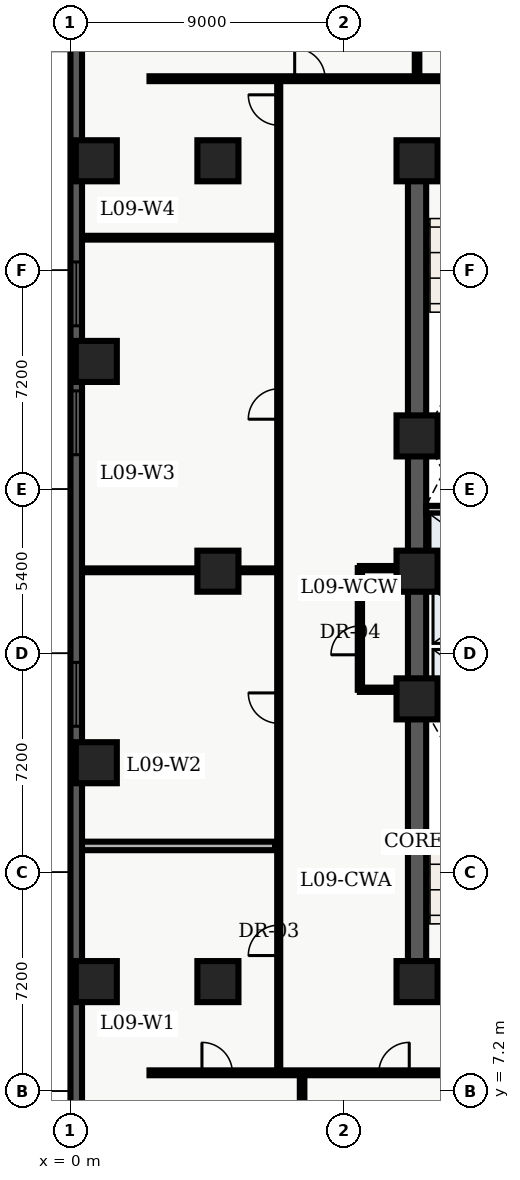
"""IFC4 building model, lengths in metres.
Left out: names, types, materials, properties, quantities, classifications, styles, units other than length and angle.
Written with IfcOpenShell. Run it as: python <this file> out.ifc"""

import sys

from ifc_helpers import new_model, entity, si_unit, converted_unit, direction, frame, origin_with_axes, origin_2d_with_axis, place, context, subcontext, project, spatial, polyline, rectangle, outline, extrude, element, fill, save


model = new_model("IFC4")
c1 = context("Model", 3, precision=1e-05, world=origin_with_axes(), true_north=direction((0.0, 1.0)))
c2 = subcontext(c1, "Body", "Model", "MODEL_VIEW")
j1 = project(units=[si_unit("LENGTHUNIT", "METRE"), converted_unit("PLANEANGLEUNIT", "DEGREE", entity("IfcPlaneAngleMeasure", 0.017), si_unit("PLANEANGLEUNIT", "RADIAN"), dimensions=[0, 0, 0, 0, 0, 0, 0])], contexts=[c1])
p1 = place(None, origin_with_axes())
s1 = spatial("IfcSite", under=j1, at=p1, CompositionType="ELEMENT")
p2 = place(p1, origin_with_axes())
s2 = spatial("IfcBuilding", under=s1, at=p2, CompositionType="ELEMENT")
p3 = place(p2, frame((0.0, 0.0, 40.5), z_axis=(0.0, 0.0, 1.0), x_axis=(1.0, 0.0, 0.0)))
s3 = spatial("IfcBuildingStorey", under=s2, at=p3, CompositionType="ELEMENT", Elevation=40.5)
p4 = place(p3, frame((11.4, 10.8, 0.0), z_axis=(0.0, 0.0, 1.0), x_axis=(0.0, 1.0, 0.0)))
e1 = element("IfcWall", 1, at=p4, inside=s3, PredefinedType="SHEAR", context=c2, shape_type="SweptSolid", body=[
    extrude(outline(polyline([(0.0, -0.3), (27.0, -0.3), (27.0, 0.3), (0.0, 0.3), (0.0, -0.3)])), origin_with_axes(), (0.0, 0.0, 1.0), 3.66),
])
p5 = place(p3, frame((11.4, 10.8, 0.0), z_axis=(0.0, 0.0, 1.0), x_axis=(1.0, 0.0, 0.0)))
e2 = element("IfcWall", 2, at=p5, inside=s3, PredefinedType="SHEAR", context=c2, shape_type="SweptSolid", body=[
    extrude(outline(polyline([(0.0, -0.3), (7.2, -0.3), (7.2, 0.3), (0.0, 0.3), (0.0, -0.3)])), origin_with_axes(), (0.0, 0.0, 1.0), 3.66),
])
p6 = place(p5, frame((2.625, 0.0, 0.0), z_axis=(0.0, 0.0, 1.0), x_axis=(1.0, 0.0, 0.0)))
e3 = element("IfcOpeningElement", 3, at=p6, cuts=e2, PredefinedType="OPENING", context=c2, shape_type="SweptSolid", body=[
    extrude(rectangle(XDim=1.05, YDim=0.62, at=origin_2d_with_axis()), origin_with_axes(), (0.0, 0.0, 1.0), 2.15),
])
p7 = place(p3, frame((11.4, 37.8, 0.0), z_axis=(0.0, 0.0, 1.0), x_axis=(1.0, 0.0, 0.0)))
e4 = element("IfcWall", 4, at=p7, inside=s3, PredefinedType="SHEAR", context=c2, shape_type="SweptSolid", body=[
    extrude(outline(polyline([(0.0, -0.3), (7.2, -0.3), (7.2, 0.3), (0.0, 0.3), (0.0, -0.3)])), origin_with_axes(), (0.0, 0.0, 1.0), 3.66),
])
p8 = place(p7, frame((2.625, 0.0, 0.0), z_axis=(0.0, 0.0, 1.0), x_axis=(1.0, 0.0, 0.0)))
e5 = element("IfcOpeningElement", 5, at=p8, cuts=e4, PredefinedType="OPENING", context=c2, shape_type="SweptSolid", body=[
    extrude(rectangle(XDim=1.05, YDim=0.62, at=origin_2d_with_axis()), origin_with_axes(), (0.0, 0.0, 1.0), 2.15),
])
for number, where, z_axis, x_axis in (
    (6, (11.7, 19.825, 0.0), (0.0, 0.0, 1.0), (1.0, 0.0, 0.0)),
    (7, (11.7, 28.775, 0.0), (0.0, 0.0, 1.0), (1.0, 0.0, 0.0)),
):
    element("IfcWall", number, at=place(p3, frame(where, z_axis=z_axis, x_axis=x_axis)), inside=s3, PredefinedType="SHEAR", context=c2, shape_type="SweptSolid", body=[
        extrude(outline(polyline([(0.0, -0.125), (6.6, -0.125), (6.6, 0.125), (0.0, 0.125), (0.0, -0.125)])), origin_with_axes(), (0.0, 0.0, 1.0), 3.66),
    ])
p9 = place(p3, frame((11.7, 24.1, 0.0), z_axis=(0.0, 0.0, 1.0), x_axis=(1.0, 0.0, 0.0)))
e8 = element("IfcWall", 8, at=p9, inside=s3, PredefinedType="SOLIDWALL", context=c2, shape_type="SweptSolid", body=[
    extrude(outline(polyline([(0.0, -0.125), (6.6, -0.125), (6.6, 0.125), (0.0, 0.125), (0.0, -0.125)])), origin_with_axes(), (0.0, 0.0, 1.0), 2.7),
])
p10 = place(p9, frame((3.75, 0.0, 0.0), z_axis=(0.0, 0.0, 1.0), x_axis=(1.0, 0.0, 0.0)))
e9 = element("IfcOpeningElement", 9, at=p10, cuts=e8, PredefinedType="OPENING", context=c2, shape_type="SweptSolid", body=[
    extrude(rectangle(XDim=0.9, YDim=0.27, at=origin_2d_with_axis()), origin_with_axes(), (0.0, 0.0, 1.0), 2.15),
])
p11 = place(p3, frame((11.7, 26.325, 0.0), z_axis=(0.0, 0.0, 1.0), x_axis=(1.0, 0.0, 0.0)))
e10 = element("IfcWall", 10, at=p11, inside=s3, PredefinedType="SOLIDWALL", context=c2, shape_type="SweptSolid", body=[
    extrude(outline(polyline([(0.0, -0.125), (6.6, -0.125), (6.6, 0.125), (0.0, 0.125), (0.0, -0.125)])), origin_with_axes(), (0.0, 0.0, 1.0), 2.7),
])
p12 = place(p11, frame((3.5, 0.0, 0.0), z_axis=(0.0, 0.0, 1.0), x_axis=(1.0, 0.0, 0.0)))
e11 = element("IfcOpeningElement", 11, at=p12, cuts=e10, PredefinedType="OPENING", context=c2, shape_type="SweptSolid", body=[
    extrude(rectangle(XDim=0.9, YDim=0.27, at=origin_2d_with_axis()), origin_with_axes(), (0.0, 0.0, 1.0), 2.15),
])
for number, where, z_axis, x_axis in (
    (12, (11.4, 10.8, 0.0), (0.0, 0.0, 1.0), (1.0, 0.0, 0.0)),
    (13, (11.4, 20.1, 0.0), (0.0, 0.0, 1.0), (1.0, 0.0, 0.0)),
    (14, (11.4, 24.3, 0.0), (0.0, 0.0, 1.0), (1.0, 0.0, 0.0)),
    (15, (11.4, 28.75, 0.0), (0.0, 0.0, 1.0), (1.0, 0.0, 0.0)),
    (16, (11.4, 37.8, 0.0), (0.0, 0.0, 1.0), (1.0, 0.0, 0.0)),
    (17, (4.85, 10.8, 0.0), (0.0, 0.0, 1.0), (1.0, 0.0, 0.0)),
    (18, (4.85, 24.3, 0.0), (0.0, 0.0, 1.0), (1.0, 0.0, 0.0)),
    (19, (4.85, 37.8, 0.0), (0.0, 0.0, 1.0), (1.0, 0.0, 0.0)),
    (20, (0.85, 10.8, 0.0), (0.0, 0.0, 1.0), (1.0, 0.0, 0.0)),
    (21, (0.85, 18.0, 0.0), (0.0, 0.0, 1.0), (1.0, 0.0, 0.0)),
    (22, (0.85, 31.2, 0.0), (0.0, 0.0, 1.0), (1.0, 0.0, 0.0)),
    (23, (0.85, 37.8, 0.0), (0.0, 0.0, 1.0), (1.0, 0.0, 0.0)),
):
    element("IfcColumn", number, at=place(p3, frame(where, z_axis=z_axis, x_axis=x_axis)), inside=s3, PredefinedType="COLUMN", context=c2, shape_type="SweptSolid", body=[
        extrude(rectangle(XDim=1.35, YDim=1.35, at=origin_2d_with_axis()), origin_with_axes(), (0.0, 0.0, 1.0), 3.9),
    ])
p13 = place(p3, frame((9.52, 20.4, 0.0), z_axis=(0.0, 0.0, 1.0), x_axis=(0.0, 1.0, 0.0)))
e24 = element("IfcWall", 24, at=p13, inside=s3, PredefinedType="PARTITIONING", context=c2, shape_type="SweptSolid", body=[
    extrude(outline(polyline([(0.0, -0.07), (4.0, -0.07), (4.0, 0.07), (0.0, 0.07), (0.0, -0.07)])), origin_with_axes(), (0.0, 0.0, 1.0), 2.7),
])
p14 = place(p13, frame((1.625, 0.0, 0.0), z_axis=(0.0, 0.0, 1.0), x_axis=(1.0, 0.0, 0.0)))
e25 = element("IfcOpeningElement", 25, at=p14, cuts=e24, PredefinedType="OPENING", context=c2, shape_type="SweptSolid", body=[
    extrude(rectangle(XDim=0.95, YDim=0.16, at=origin_2d_with_axis()), origin_with_axes(), (0.0, 0.0, 1.0), 2.15),
])
for number, where, z_axis, x_axis in (
    (26, (9.52, 20.4, 0.0), (0.0, 0.0, 1.0), (1.0, 0.0, 0.0)),
    (27, (9.52, 24.4, 0.0), (0.0, 0.0, 1.0), (1.0, 0.0, 0.0)),
):
    element("IfcWall", number, at=place(p3, frame(where, z_axis=z_axis, x_axis=x_axis)), inside=s3, PredefinedType="PARTITIONING", context=c2, shape_type="SweptSolid", body=[
        extrude(outline(polyline([(0.0, -0.07), (1.58, -0.07), (1.58, 0.07), (0.0, 0.07), (0.0, -0.07)])), origin_with_axes(), (0.0, 0.0, 1.0), 2.7),
    ])
p15 = place(p3, frame((2.6, 7.8, 0.0), z_axis=(0.0, 0.0, 1.0), x_axis=(1.0, 0.0, 0.0)))
e28 = element("IfcWall", 28, at=p15, inside=s3, PredefinedType="PARTITIONING", context=c2, shape_type="SweptSolid", body=[
    extrude(outline(polyline([(0.0, -0.08), (18.55, -0.08), (18.55, 0.08), (0.0, 0.08), (0.0, -0.08)])), origin_with_axes(), (0.0, 0.0, 1.0), 2.7),
])
p16 = place(p15, frame((2.225, 0.0, 0.0), z_axis=(0.0, 0.0, 1.0), x_axis=(1.0, 0.0, 0.0)))
e29 = element("IfcOpeningElement", 29, at=p16, cuts=e28, PredefinedType="OPENING", context=c2, shape_type="SweptSolid", body=[
    extrude(rectangle(XDim=1.0, YDim=0.18, at=origin_2d_with_axis()), origin_with_axes(), (0.0, 0.0, 1.0), 2.15),
])
p17 = place(p15, frame((8.043, 0.0, 0.0), z_axis=(0.0, 0.0, 1.0), x_axis=(1.0, 0.0, 0.0)))
e30 = element("IfcOpeningElement", 30, at=p17, cuts=e28, PredefinedType="OPENING", context=c2, shape_type="SweptSolid", body=[
    extrude(rectangle(XDim=1.0, YDim=0.18, at=origin_2d_with_axis()), origin_with_axes(), (0.0, 0.0, 1.0), 2.15),
])
p18 = place(p15, frame((14.784, 0.0, 0.0), z_axis=(0.0, 0.0, 1.0), x_axis=(1.0, 0.0, 0.0)))
e31 = element("IfcOpeningElement", 31, at=p18, cuts=e28, PredefinedType="OPENING", context=c2, shape_type="SweptSolid", body=[
    extrude(rectangle(XDim=1.0, YDim=0.18, at=origin_2d_with_axis()), origin_with_axes(), (0.0, 0.0, 1.0), 2.15),
])
p19 = place(p3, frame((2.6, 40.5, 0.0), z_axis=(0.0, 0.0, 1.0), x_axis=(1.0, 0.0, 0.0)))
e32 = element("IfcWall", 32, at=p19, inside=s3, PredefinedType="PARTITIONING", context=c2, shape_type="SweptSolid", body=[
    extrude(outline(polyline([(0.0, -0.08), (18.65, -0.08), (18.65, 0.08), (0.0, 0.08), (0.0, -0.08)])), origin_with_axes(), (0.0, 0.0, 1.0), 2.7),
])
p20 = place(p19, frame((5.275, 0.0, 0.0), z_axis=(0.0, 0.0, 1.0), x_axis=(1.0, 0.0, 0.0)))
e33 = element("IfcOpeningElement", 33, at=p20, cuts=e32, PredefinedType="OPENING", context=c2, shape_type="SweptSolid", body=[
    extrude(rectangle(XDim=1.0, YDim=0.18, at=origin_2d_with_axis()), origin_with_axes(), (0.0, 0.0, 1.0), 2.15),
])
p21 = place(p19, frame((12.61, 0.0, 0.0), z_axis=(0.0, 0.0, 1.0), x_axis=(1.0, 0.0, 0.0)))
e34 = element("IfcOpeningElement", 34, at=p21, cuts=e32, PredefinedType="OPENING", context=c2, shape_type="SweptSolid", body=[
    extrude(rectangle(XDim=1.2, YDim=0.18, at=origin_2d_with_axis()), origin_with_axes(), (0.0, 0.0, 1.0), 2.2),
])
p22 = place(p3, frame((6.85, 7.8, 0.0), z_axis=(0.0, 0.0, 1.0), x_axis=(0.0, 1.0, 0.0)))
e35 = element("IfcWall", 35, at=p22, inside=s3, PredefinedType="PARTITIONING", context=c2, shape_type="SweptSolid", body=[
    extrude(outline(polyline([(0.0, -0.05), (32.7, -0.05), (32.7, 0.05), (0.0, 0.05), (0.0, -0.05)])), origin_with_axes(), (0.0, 0.0, 1.0), 2.7),
])
p23 = place(p22, frame((4.357, 0.0, 0.0), z_axis=(0.0, 0.0, 1.0), x_axis=(1.0, 0.0, 0.0)))
e36 = element("IfcOpeningElement", 36, at=p23, cuts=e35, PredefinedType="OPENING", context=c2, shape_type="SweptSolid", body=[
    extrude(rectangle(XDim=1.0, YDim=0.12, at=origin_2d_with_axis()), origin_with_axes(), (0.0, 0.0, 1.0), 2.15),
])
p24 = place(p22, frame((11.996, 0.0, 0.0), z_axis=(0.0, 0.0, 1.0), x_axis=(1.0, 0.0, 0.0)))
e37 = element("IfcOpeningElement", 37, at=p24, cuts=e35, PredefinedType="OPENING", context=c2, shape_type="SweptSolid", body=[
    extrude(rectangle(XDim=1.0, YDim=0.12, at=origin_2d_with_axis()), origin_with_axes(), (0.0, 0.0, 1.0), 2.15),
])
p25 = place(p22, frame((22.0, 0.0, 0.0), z_axis=(0.0, 0.0, 1.0), x_axis=(1.0, 0.0, 0.0)))
e38 = element("IfcOpeningElement", 38, at=p25, cuts=e35, PredefinedType="OPENING", context=c2, shape_type="SweptSolid", body=[
    extrude(rectangle(XDim=1.0, YDim=0.12, at=origin_2d_with_axis()), origin_with_axes(), (0.0, 0.0, 1.0), 2.15),
])
p26 = place(p22, frame((31.67, 0.0, 0.0), z_axis=(0.0, 0.0, 1.0), x_axis=(1.0, 0.0, 0.0)))
e39 = element("IfcOpeningElement", 39, at=p26, cuts=e35, PredefinedType="OPENING", context=c2, shape_type="SweptSolid", body=[
    extrude(rectangle(XDim=1.0, YDim=0.12, at=origin_2d_with_axis()), origin_with_axes(), (0.0, 0.0, 1.0), 2.15),
])
p27 = place(p3, frame((0.375, 15.263, 0.0), z_axis=(0.0, 0.0, 1.0), x_axis=(1.0, 0.0, 0.0)))
e40 = element("IfcWall", 40, at=p27, inside=s3, PredefinedType="PARTITIONING", context=c2, shape_type="SweptSolid", body=[
    extrude(outline(polyline([(0.0, -0.14), (6.355, -0.14), (6.355, 0.14), (0.0, 0.14), (0.0, -0.14)])), origin_with_axes(), (0.0, 0.0, 1.0), 2.7),
])
for number, where, z_axis, x_axis in (
    (41, (0.375, 24.329, 0.0), (0.0, 0.0, 1.0), (1.0, 0.0, 0.0)),
    (42, (0.375, 35.27, 0.0), (0.0, 0.0, 1.0), (1.0, 0.0, 0.0)),
):
    element("IfcWall", number, at=place(p3, frame(where, z_axis=z_axis, x_axis=x_axis)), inside=s3, PredefinedType="PARTITIONING", context=c2, shape_type="SweptSolid", body=[
        extrude(outline(polyline([(0.0, -0.062), (6.355, -0.062), (6.355, 0.062), (0.0, 0.062), (0.0, -0.062)])), origin_with_axes(), (0.0, 0.0, 1.0), 2.7),
    ])
p28 = place(p3, frame((7.619, 0.36, 0.0), z_axis=(0.0, 0.0, 1.0), x_axis=(0.0, 1.0, 0.0)))
e43 = element("IfcWall", 43, at=p28, inside=s3, PredefinedType="PARTITIONING", context=c2, shape_type="SweptSolid", body=[
    extrude(outline(polyline([(0.0, -0.075), (7.34, -0.075), (7.34, 0.075), (0.0, 0.075), (0.0, -0.075)])), origin_with_axes(), (0.0, 0.0, 1.0), 2.7),
])
p29 = place(p3, frame((11.4, 40.6, 0.0), z_axis=(0.0, 0.0, 1.0), x_axis=(0.0, 1.0, 0.0)))
e44 = element("IfcWall", 44, at=p29, inside=s3, PredefinedType="PARTITIONING", context=c2, shape_type="SweptSolid", body=[
    extrude(outline(polyline([(0.0, -0.075), (7.64, -0.075), (7.64, 0.075), (0.0, 0.075), (0.0, -0.075)])), origin_with_axes(), (0.0, 0.0, 1.0), 2.7),
])
p30 = place(p3, frame((0.19, 2.78, 0.0), z_axis=(0.0, 0.0, 1.0), x_axis=(0.0, 1.0, 0.0)))
e45 = element("IfcWall", 45, at=p30, inside=s3, PredefinedType="SOLIDWALL", context=c2, shape_type="SweptSolid", body=[
    extrude(outline(polyline([(0.0, -0.19), (43.42, -0.19), (43.42, 0.19), (0.0, 0.19), (0.0, -0.19)])), origin_with_axes(), (0.0, 0.0, 1.0), 3.66),
])
p31 = place(p30, frame((2.946, 0.0, 0.45), z_axis=(0.0, 0.0, 1.0), x_axis=(1.0, 0.0, 0.0)))
e46 = element("IfcOpeningElement", 46, at=p31, cuts=e45, PredefinedType="OPENING", context=c2, shape_type="SweptSolid", body=[
    extrude(rectangle(XDim=2.1, YDim=0.4, at=origin_2d_with_axis()), origin_with_axes(), (0.0, 0.0, 1.0), 2.2),
])
p32 = place(p30, frame((17.469, 0.0, 0.45), z_axis=(0.0, 0.0, 1.0), x_axis=(1.0, 0.0, 0.0)))
e47 = element("IfcOpeningElement", 47, at=p32, cuts=e45, PredefinedType="OPENING", context=c2, shape_type="SweptSolid", body=[
    extrude(rectangle(XDim=2.1, YDim=0.4, at=origin_2d_with_axis()), origin_with_axes(), (0.0, 0.0, 1.0), 2.2),
])
p33 = place(p30, frame((26.401, 0.0, 0.45), z_axis=(0.0, 0.0, 1.0), x_axis=(1.0, 0.0, 0.0)))
e48 = element("IfcOpeningElement", 48, at=p33, cuts=e45, PredefinedType="OPENING", context=c2, shape_type="SweptSolid", body=[
    extrude(rectangle(XDim=2.1, YDim=0.4, at=origin_2d_with_axis()), origin_with_axes(), (0.0, 0.0, 1.0), 2.2),
])
p34 = place(p30, frame((30.642, 0.0, 0.45), z_axis=(0.0, 0.0, 1.0), x_axis=(1.0, 0.0, 0.0)))
e49 = element("IfcOpeningElement", 49, at=p34, cuts=e45, PredefinedType="OPENING", context=c2, shape_type="SweptSolid", body=[
    extrude(rectangle(XDim=2.1, YDim=0.4, at=origin_2d_with_axis()), origin_with_axes(), (0.0, 0.0, 1.0), 2.2),
])
p35 = place(p30, frame((40.024, 0.0, 0.45), z_axis=(0.0, 0.0, 1.0), x_axis=(1.0, 0.0, 0.0)))
e50 = element("IfcOpeningElement", 50, at=p35, cuts=e45, PredefinedType="OPENING", context=c2, shape_type="SweptSolid", body=[
    extrude(rectangle(XDim=2.1, YDim=0.4, at=origin_2d_with_axis()), origin_with_axes(), (0.0, 0.0, 1.0), 2.2),
])
p36 = place(p13, frame((1.625, 0.0, 0.0), z_axis=(0.0, 0.0, 1.0), x_axis=(1.0, 0.0, 0.0)))
e51 = element("IfcDoor", 51, at=p36, inside=s3, OperationType="SINGLE_SWING_LEFT", PredefinedType="DOOR", context=c2, shape_type="SweptSolid", body=[
    extrude(rectangle(XDim=0.95, YDim=0.084, at=origin_2d_with_axis()), origin_with_axes(), (0.0, 0.0, 1.0), 2.15),
])
fill(e25, e51)
p37 = place(p22, frame((4.357, 0.0, 0.0), z_axis=(0.0, 0.0, 1.0), x_axis=(1.0, 0.0, 0.0)))
e52 = element("IfcDoor", 52, at=p37, inside=s3, OperationType="SINGLE_SWING_LEFT", PredefinedType="DOOR", context=c2, shape_type="SweptSolid", body=[
    extrude(rectangle(XDim=1.0, YDim=0.06, at=origin_2d_with_axis()), origin_with_axes(), (0.0, 0.0, 1.0), 2.15),
])
fill(e36, e52)
p38 = place(p22, frame((11.996, 0.0, 0.0), z_axis=(0.0, 0.0, 1.0), x_axis=(1.0, 0.0, 0.0)))
e53 = element("IfcDoor", 53, at=p38, inside=s3, OperationType="SINGLE_SWING_RIGHT", PredefinedType="DOOR", context=c2, shape_type="SweptSolid", body=[
    extrude(rectangle(XDim=1.0, YDim=0.06, at=origin_2d_with_axis()), origin_with_axes(), (0.0, 0.0, 1.0), 2.15),
])
fill(e37, e53)
p39 = place(p22, frame((22.0, 0.0, 0.0), z_axis=(0.0, 0.0, 1.0), x_axis=(1.0, 0.0, 0.0)))
e54 = element("IfcDoor", 54, at=p39, inside=s3, OperationType="SINGLE_SWING_LEFT", PredefinedType="DOOR", context=c2, shape_type="SweptSolid", body=[
    extrude(rectangle(XDim=1.0, YDim=0.06, at=origin_2d_with_axis()), origin_with_axes(), (0.0, 0.0, 1.0), 2.15),
])
fill(e38, e54)
p40 = place(p22, frame((31.67, 0.0, 0.0), z_axis=(0.0, 0.0, 1.0), x_axis=(1.0, 0.0, 0.0)))
e55 = element("IfcDoor", 55, at=p40, inside=s3, OperationType="SINGLE_SWING_RIGHT", PredefinedType="DOOR", context=c2, shape_type="SweptSolid", body=[
    extrude(rectangle(XDim=1.0, YDim=0.06, at=origin_2d_with_axis()), origin_with_axes(), (0.0, 0.0, 1.0), 2.15),
])
fill(e39, e55)
p41 = place(p15, frame((2.225, 0.0, 0.0), z_axis=(0.0, 0.0, 1.0), x_axis=(1.0, 0.0, 0.0)))
e56 = element("IfcDoor", 56, at=p41, inside=s3, OperationType="SINGLE_SWING_LEFT", PredefinedType="DOOR", context=c2, shape_type="SweptSolid", body=[
    extrude(rectangle(XDim=1.0, YDim=0.09, at=origin_2d_with_axis()), origin_with_axes(), (0.0, 0.0, 1.0), 2.15),
])
fill(e29, e56)
p42 = place(p15, frame((8.043, 0.0, 0.0), z_axis=(0.0, 0.0, 1.0), x_axis=(1.0, 0.0, 0.0)))
e57 = element("IfcDoor", 57, at=p42, inside=s3, OperationType="SINGLE_SWING_RIGHT", PredefinedType="DOOR", context=c2, shape_type="SweptSolid", body=[
    extrude(rectangle(XDim=1.0, YDim=0.09, at=origin_2d_with_axis()), origin_with_axes(), (0.0, 0.0, 1.0), 2.15),
])
fill(e30, e57)
p43 = place(p19, frame((5.275, 0.0, 0.0), z_axis=(0.0, 0.0, 1.0), x_axis=(1.0, 0.0, 0.0)))
e58 = element("IfcDoor", 58, at=p43, inside=s3, OperationType="SINGLE_SWING_LEFT", PredefinedType="DOOR", context=c2, shape_type="SweptSolid", body=[
    extrude(rectangle(XDim=1.0, YDim=0.09, at=origin_2d_with_axis()), origin_with_axes(), (0.0, 0.0, 1.0), 2.15),
])
fill(e33, e58)
p44 = place(p30, frame((17.469, 0.0, 0.45), z_axis=(0.0, 0.0, 1.0), x_axis=(1.0, 0.0, 0.0)))
e59 = element("IfcWindow", 59, at=p44, inside=s3, PredefinedType="WINDOW", context=c2, shape_type="SweptSolid", body=[
    extrude(rectangle(XDim=2.1, YDim=0.09, at=origin_2d_with_axis()), origin_with_axes(), (0.0, 0.0, 1.0), 2.2),
])
fill(e47, e59)
p45 = place(p30, frame((26.401, 0.0, 0.45), z_axis=(0.0, 0.0, 1.0), x_axis=(1.0, 0.0, 0.0)))
e60 = element("IfcWindow", 60, at=p45, inside=s3, PredefinedType="WINDOW", context=c2, shape_type="SweptSolid", body=[
    extrude(rectangle(XDim=2.1, YDim=0.09, at=origin_2d_with_axis()), origin_with_axes(), (0.0, 0.0, 1.0), 2.2),
])
fill(e48, e60)
p46 = place(p30, frame((30.642, 0.0, 0.45), z_axis=(0.0, 0.0, 1.0), x_axis=(1.0, 0.0, 0.0)))
e61 = element("IfcWindow", 61, at=p46, inside=s3, PredefinedType="WINDOW", context=c2, shape_type="SweptSolid", body=[
    extrude(rectangle(XDim=2.1, YDim=0.09, at=origin_2d_with_axis()), origin_with_axes(), (0.0, 0.0, 1.0), 2.2),
])
fill(e49, e61)
save(model, sys.argv[1])
